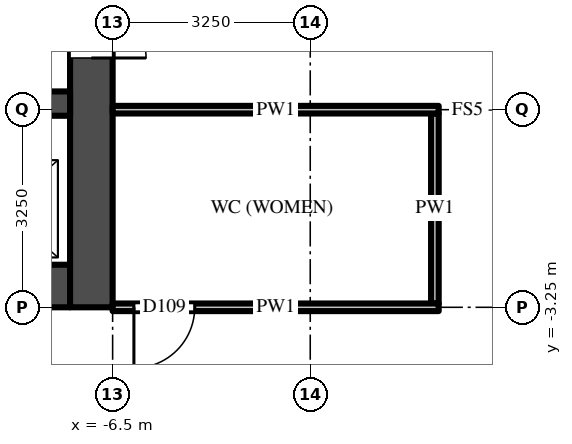
"""IFC4 building model, lengths in metres.
Left out: names, types, materials, properties, quantities, classifications, styles, units other than length and angle.
Written with IfcOpenShell. Run it as: python <this file> out.ifc"""

import sys

from ifc_helpers import new_model, si_unit, direction, frame, frame_2d, origin, place, context, subcontext, project, spatial, rectangle, extrude, source, transform, mapped, element, fill, save


model = new_model("IFC4")
c1 = context("Model", 3, precision=1e-05, world=origin(), true_north=direction((0.0, 1.0)))
c2 = subcontext(c1, "Body", "Model", "MODEL_VIEW")
j1 = project(units=[si_unit("LENGTHUNIT", "METRE"), si_unit("PLANEANGLEUNIT", "RADIAN")], contexts=[c1])
p1 = place(None, origin())
s1 = spatial("IfcSite", under=j1, at=p1, CompositionType="ELEMENT")
p2 = place(p1, origin())
s2 = spatial("IfcBuilding", under=s1, at=p2, CompositionType="ELEMENT")
p3 = place(p2, frame((0.0, 0.0, 181.5)))
s3 = spatial("IfcBuildingStorey", under=s2, at=p3, CompositionType="ELEMENT", Elevation=181.5)
m1 = source(origin(), c2, "Body", "SweptSolid", [
    extrude(rectangle(XDim=14.85, YDim=0.7, at=frame_2d((7.425, 0.0))), origin(), (0.0, 0.0, 1.0), 3.7),
])
p4 = place(p3, frame((-7.2, -2.9, 0.0), z_axis=(0.0, 0.0, 1.0), x_axis=(-1.0, 0.0, 0.0)))
e1 = element("IfcWall", 1, at=p4, inside=s3, PredefinedType="SHEAR", context=c2, shape_type="MappedRepresentation", body=[
    mapped(m1, transform((0.0, 0.0, 0.0))),
])
m2 = source(origin(), c2, "Body", "SweptSolid", [
    extrude(rectangle(XDim=1.1, YDim=2.1, at=frame_2d((0.55, 1.05))), frame((0.0, 0.36, 0.0), z_axis=(0.0, -1.0, 0.0), x_axis=(1.0, 0.0, 0.0)), (0.0, 0.0, 1.0), 0.72),
])
p5 = place(p4, frame((0.55, 0.0, 0.0)))
e2 = element("IfcOpeningElement", 2, at=p5, cuts=e1, PredefinedType="OPENING", context=c2, shape_type="MappedRepresentation", body=[
    mapped(m2, transform((0.0, 0.0, 0.0))),
])
p6 = place(p4, frame((3.15, 0.0, 0.0)))
e3 = element("IfcOpeningElement", 3, at=p6, cuts=e1, PredefinedType="OPENING", context=c2, shape_type="MappedRepresentation", body=[
    mapped(m2, transform((0.0, 0.0, 0.0))),
])
m3 = source(origin(), c2, "Body", "SweptSolid", [
    extrude(rectangle(XDim=1.2, YDim=2.1, at=frame_2d((0.6, 1.05))), frame((0.0, 0.36, 0.0), z_axis=(0.0, -1.0, 0.0), x_axis=(1.0, 0.0, 0.0)), (0.0, 0.0, 1.0), 0.72),
])
p7 = place(p4, frame((5.7, 0.0, 0.0)))
e4 = element("IfcOpeningElement", 4, at=p7, cuts=e1, PredefinedType="OPENING", context=c2, shape_type="MappedRepresentation", body=[
    mapped(m3, transform((0.0, 0.0, 0.0))),
])
m4 = source(origin(), c2, "Body", "SweptSolid", [
    extrude(rectangle(XDim=1.3, YDim=2.1, at=frame_2d((0.65, 1.05))), frame((0.0, 0.36, 0.0), z_axis=(0.0, -1.0, 0.0), x_axis=(1.0, 0.0, 0.0)), (0.0, 0.0, 1.0), 0.72),
])
p8 = place(p4, frame((12.2, 0.0, 0.0)))
e5 = element("IfcOpeningElement", 5, at=p8, cuts=e1, PredefinedType="OPENING", context=c2, shape_type="MappedRepresentation", body=[
    mapped(m4, transform((0.0, 0.0, 0.0))),
])
p9 = place(p4, frame((9.85, 0.0, 0.0)))
e6 = element("IfcOpeningElement", 6, at=p9, cuts=e1, PredefinedType="OPENING", context=c2, shape_type="MappedRepresentation", body=[
    mapped(m3, transform((0.0, 0.0, 0.0))),
])
m5 = source(origin(), c2, "Body", "SweptSolid", [
    extrude(rectangle(XDim=1.0, YDim=2.1, at=frame_2d((0.5, 1.05))), frame((0.0, 0.36, 0.0), z_axis=(0.0, -1.0, 0.0), x_axis=(1.0, 0.0, 0.0)), (0.0, 0.0, 1.0), 0.72),
])
p10 = place(p4, frame((7.9, 0.0, 0.0)))
e7 = element("IfcOpeningElement", 7, at=p10, cuts=e1, PredefinedType="OPENING", context=c2, shape_type="MappedRepresentation", body=[
    mapped(m5, transform((0.0, 0.0, 0.0))),
])
m6 = source(origin(), c2, "Body", "SweptSolid", [
    extrude(rectangle(XDim=9.05, YDim=0.7, at=frame_2d((4.525, 0.0))), origin(), (0.0, 0.0, 1.0), 3.7),
])
p11 = place(p3, frame((-6.85, 5.8, 0.0), z_axis=(0.0, 0.0, 1.0), x_axis=(0.0, -1.0, 0.0)))
e8 = element("IfcWall", 8, at=p11, inside=s3, PredefinedType="SHEAR", context=c2, shape_type="MappedRepresentation", body=[
    mapped(m6, transform((0.0, 0.0, 0.0))),
])
m7 = source(origin(), c2, "Body", "SweptSolid", [
    extrude(rectangle(XDim=1.8, YDim=2.1, at=frame_2d((0.9, 1.05))), frame((0.0, 0.36, 0.0), z_axis=(0.0, -1.0, 0.0), x_axis=(1.0, 0.0, 0.0)), (0.0, 0.0, 1.0), 0.72),
])
p12 = place(p11, frame((3.15, 0.0, 0.0)))
e9 = element("IfcOpeningElement", 9, at=p12, cuts=e8, PredefinedType="OPENING", context=c2, shape_type="MappedRepresentation", body=[
    mapped(m7, transform((0.0, 0.0, 0.0))),
])
m8 = source(origin(), c2, "Body", "SweptSolid", [
    extrude(rectangle(XDim=14.85, YDim=0.4, at=frame_2d((7.425, 0.0))), origin(), (0.0, 0.0, 1.0), 3.7),
])
p13 = place(p3, frame((-7.2, 0.1, 0.0), z_axis=(0.0, 0.0, 1.0), x_axis=(-1.0, 0.0, 0.0)))
e10 = element("IfcWall", 10, at=p13, inside=s3, PredefinedType="SHEAR", context=c2, shape_type="MappedRepresentation", body=[
    mapped(m8, transform((0.0, 0.0, 0.0))),
])
m9 = source(origin(), c2, "Body", "SweptSolid", [
    extrude(rectangle(XDim=1.0, YDim=2.1, at=frame_2d((0.5, 1.05))), frame((0.0, 0.21, 0.0), z_axis=(0.0, -1.0, 0.0), x_axis=(1.0, 0.0, 0.0)), (0.0, 0.0, 1.0), 0.42),
])
p14 = place(p13, frame((7.9, 0.0, 0.0)))
e11 = element("IfcOpeningElement", 11, at=p14, cuts=e10, PredefinedType="OPENING", context=c2, shape_type="MappedRepresentation", body=[
    mapped(m9, transform((0.0, 0.0, 0.0))),
])
m10 = source(origin(), c2, "Body", "SweptSolid", [
    extrude(rectangle(XDim=3.125, YDim=0.125, at=frame_2d((1.562, 0.0))), origin(), (0.0, 0.0, 1.0), 3.068),
])
p15 = place(p3, frame((-1.2, -0.062, 0.0), z_axis=(0.0, 0.0, 1.0), x_axis=(0.0, -1.0, 0.0)))
e12 = element("IfcWall", 12, at=p15, inside=s3, PredefinedType="PARTITIONING", context=c2, shape_type="MappedRepresentation", body=[
    mapped(m10, transform((0.0, 0.0, 0.0))),
])
m11 = source(origin(), c2, "Body", "SweptSolid", [
    extrude(rectangle(XDim=5.363, YDim=0.125, at=frame_2d((2.681, 0.0))), origin(), (0.0, 0.0, 1.0), 2.997),
])
p16 = place(p3, frame((-1.137, -3.25, 0.0), z_axis=(0.0, 0.0, 1.0), x_axis=(-1.0, 0.0, 0.0)))
e13 = element("IfcWall", 13, at=p16, inside=s3, PredefinedType="PARTITIONING", context=c2, shape_type="MappedRepresentation", body=[
    mapped(m11, transform((0.0, 0.0, 0.0))),
])
m12 = source(origin(), c2, "Body", "SweptSolid", [
    extrude(rectangle(XDim=1.0, YDim=2.1, at=frame_2d((0.5, 1.05))), frame((0.0, 0.073, 0.0), z_axis=(0.0, -1.0, 0.0), x_axis=(1.0, 0.0, 0.0)), (0.0, 0.0, 1.0), 0.145),
])
p17 = place(p16, frame((4.012, 0.0, 0.0)))
e14 = element("IfcOpeningElement", 14, at=p17, cuts=e13, PredefinedType="OPENING", context=c2, shape_type="MappedRepresentation", body=[
    mapped(m12, transform((0.0, 0.0, 0.0))),
])
p18 = place(p3, frame((-1.137, 0.0, 0.0), z_axis=(0.0, 0.0, 1.0), x_axis=(-1.0, 0.0, 0.0)))
e15 = element("IfcWall", 15, at=p18, inside=s3, PredefinedType="PARTITIONING", context=c2, shape_type="MappedRepresentation", body=[
    mapped(m11, transform((0.0, 0.0, 0.0))),
])
m13 = source(origin(), c2, "Body", "SweptSolid", [
    extrude(rectangle(XDim=1.8, YDim=2.1, at=frame_2d((0.9, 1.05))), frame((0.0, -0.275, 0.0), z_axis=(0.0, -1.0, 0.0), x_axis=(1.0, 0.0, 0.0)), (0.0, 0.0, 1.0), 0.05),
])
p19 = place(p12, origin())
e16 = element("IfcDoor", 16, at=p19, inside=s3, OperationType="DOUBLE_DOOR_SINGLE_SWING", PredefinedType="DOOR", context=c2, shape_type="MappedRepresentation", body=[
    mapped(m13, transform((0.0, 0.0, 0.0))),
])
fill(e9, e16)
m14 = source(origin(), c2, "Body", "SweptSolid", [
    extrude(rectangle(XDim=1.0, YDim=2.1, at=frame_2d((0.5, 1.05))), frame((0.0, 0.025, 0.0), z_axis=(0.0, -1.0, 0.0), x_axis=(1.0, 0.0, 0.0)), (0.0, 0.0, 1.0), 0.05),
])
p20 = place(p17, origin())
e17 = element("IfcDoor", 17, at=p20, inside=s3, OperationType="SINGLE_SWING_RIGHT", PredefinedType="DOOR", context=c2, shape_type="MappedRepresentation", body=[
    mapped(m14, transform((0.0, 0.0, 0.0))),
])
fill(e14, e17)
save(model, sys.argv[1])
